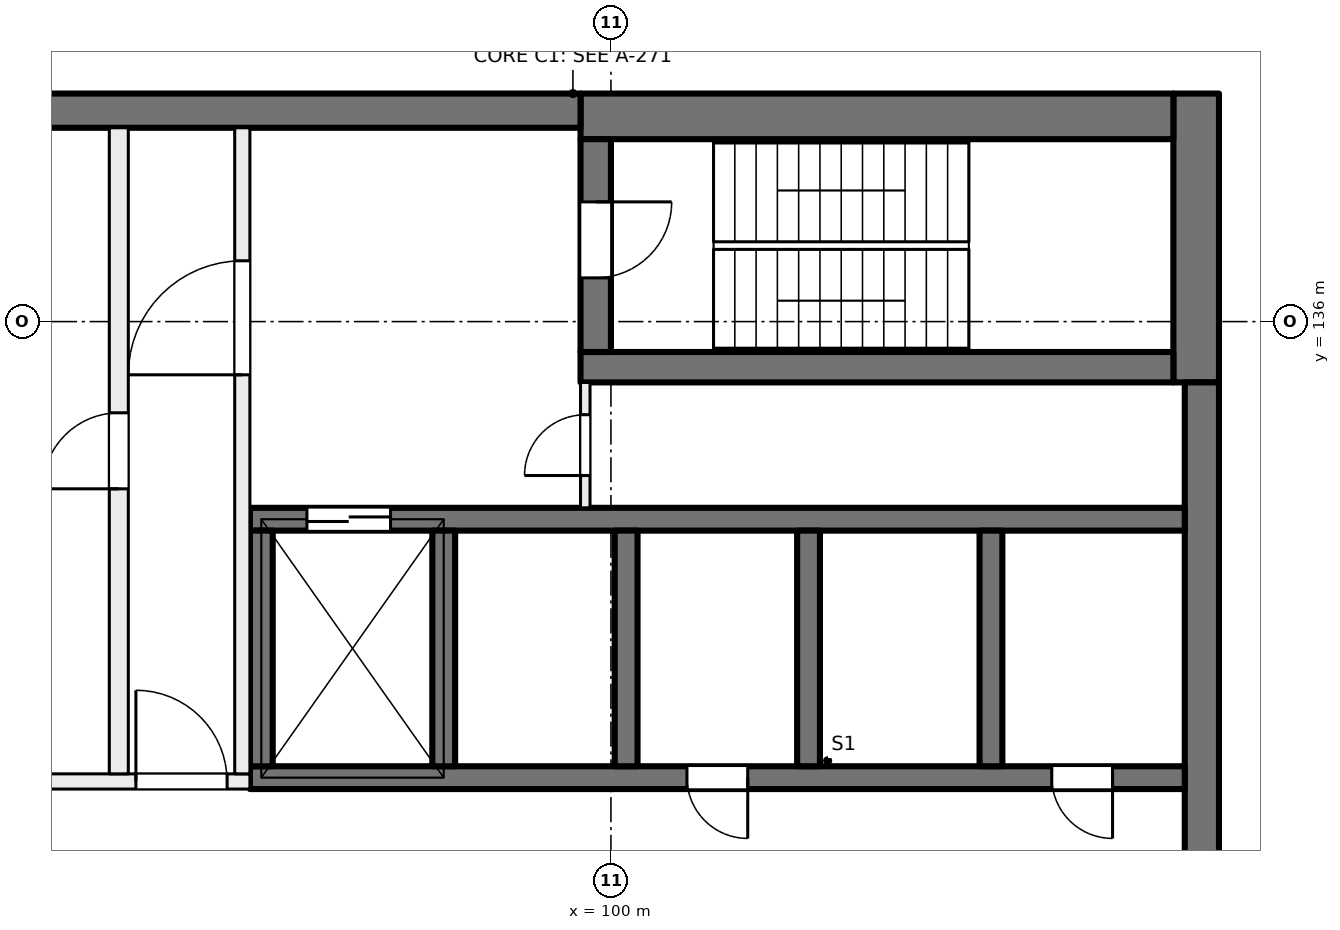
"""IFC4 building model, lengths in metres.
Left out: names, types, materials, properties, quantities, classifications, styles, units other than length and angle.
Written with IfcOpenShell. Run it as: python <this file> out.ifc"""

import sys

from ifc_helpers import new_model, si_unit, direction, frame, frame_2d, origin, place, context, subcontext, project, spatial, rectangle, extrude, element, fill, save


model = new_model("IFC4")
c1 = context("Model", 3, precision=1e-05, world=origin(), true_north=direction((0.0, 1.0)))
c2 = subcontext(c1, "Body", "Model", "MODEL_VIEW")
j1 = project(units=[si_unit("LENGTHUNIT", "METRE"), si_unit("PLANEANGLEUNIT", "RADIAN")], contexts=[c1])
p1 = place(None, origin())
s1 = spatial("IfcSite", under=j1, at=p1, CompositionType="ELEMENT")
p2 = place(p1, origin())
s2 = spatial("IfcBuilding", under=s1, at=p2, CompositionType="ELEMENT")
p3 = place(p2, frame((0.0, 0.0, 286.5)))
s3 = spatial("IfcBuildingStorey", under=s2, at=p3, CompositionType="ELEMENT", Elevation=286.5)
p4 = place(p3, frame((107.7, 139.0, 0.0), z_axis=(0.0, 0.0, 1.0), x_axis=(0.0, -1.0, 0.0)))
e1 = element("IfcWall", 1, at=p4, inside=s3, PredefinedType="SHEAR", context=c2, shape_type="SweptSolid", body=[
    extrude(rectangle(XDim=3.8, YDim=0.6, at=frame_2d((1.9, 0.0))), origin(), (0.0, 0.0, 1.0), 4.5),
])
p5 = place(p3, frame((107.775, 135.2, 0.0), z_axis=(0.0, 0.0, 1.0), x_axis=(0.0, -1.0, 0.0)))
e2 = element("IfcWall", 2, at=p5, inside=s3, PredefinedType="SHEAR", context=c2, shape_type="SweptSolid", body=[
    extrude(rectangle(XDim=14.4, YDim=0.45, at=frame_2d((7.2, 0.0))), origin(), (0.0, 0.0, 1.0), 4.5),
])
p6 = place(p3, frame((107.4, 138.7, 0.0), z_axis=(0.0, 0.0, 1.0), x_axis=(-1.0, 0.0, 0.0)))
e3 = element("IfcWall", 3, at=p6, inside=s3, PredefinedType="SHEAR", context=c2, shape_type="SweptSolid", body=[
    extrude(rectangle(XDim=7.8, YDim=0.6, at=frame_2d((3.9, 0.0))), origin(), (0.0, 0.0, 1.0), 4.5),
])
p7 = place(p3, frame((99.6, 138.775, 0.0), z_axis=(0.0, 0.0, 1.0), x_axis=(-1.0, 0.0, 0.0)))
e4 = element("IfcWall", 4, at=p7, inside=s3, PredefinedType="SHEAR", context=c2, shape_type="SweptSolid", body=[
    extrude(rectangle(XDim=9.05, YDim=0.45, at=frame_2d((4.525, 0.0))), origin(), (0.0, 0.0, 1.0), 4.5),
])
p8 = place(p3, frame((107.4, 135.4, 0.0), z_axis=(0.0, 0.0, 1.0), x_axis=(-1.0, 0.0, 0.0)))
e5 = element("IfcWall", 5, at=p8, inside=s3, PredefinedType="SHEAR", context=c2, shape_type="SweptSolid", body=[
    extrude(rectangle(XDim=7.8, YDim=0.4, at=frame_2d((3.9, 0.0))), origin(), (0.0, 0.0, 1.0), 4.5),
])
p9 = place(p3, frame((99.8, 138.4, 0.0), z_axis=(0.0, 0.0, 1.0), x_axis=(0.0, -1.0, 0.0)))
e6 = element("IfcWall", 6, at=p9, inside=s3, PredefinedType="SHEAR", context=c2, shape_type="SweptSolid", body=[
    extrude(rectangle(XDim=2.8, YDim=0.4, at=frame_2d((1.4, 0.0))), origin(), (0.0, 0.0, 1.0), 4.5),
])
p10 = place(p9, frame((0.825, 0.0, 0.0)))
e7 = element("IfcOpeningElement", 7, at=p10, cuts=e6, PredefinedType="OPENING", context=c2, shape_type="SweptSolid", body=[
    extrude(rectangle(XDim=1.0, YDim=2.1, at=frame_2d((0.5, 1.05))), frame((0.0, 0.21, 0.0), z_axis=(0.0, -1.0, 0.0), x_axis=(1.0, 0.0, 0.0)), (0.0, 0.0, 1.0), 0.42),
])
p11 = place(p3, frame((107.55, 130.0, 0.0), z_axis=(0.0, 0.0, 1.0), x_axis=(-1.0, 0.0, 0.0)))
e8 = element("IfcWall", 8, at=p11, inside=s3, PredefinedType="SHEAR", context=c2, shape_type="SweptSolid", body=[
    extrude(rectangle(XDim=12.3, YDim=0.3, at=frame_2d((6.15, 0.0))), origin(), (0.0, 0.0, 1.0), 4.5),
])
p12 = place(p11, frame((0.95, 0.0, 0.0)))
e9 = element("IfcOpeningElement", 9, at=p12, cuts=e8, PredefinedType="OPENING", context=c2, shape_type="SweptSolid", body=[
    extrude(rectangle(XDim=0.8, YDim=2.1, at=frame_2d((0.4, 1.05))), frame((0.0, 0.16, 0.0), z_axis=(0.0, -1.0, 0.0), x_axis=(1.0, 0.0, 0.0)), (0.0, 0.0, 1.0), 0.32),
])
p13 = place(p11, frame((5.75, 0.0, 0.0)))
e10 = element("IfcOpeningElement", 10, at=p13, cuts=e8, PredefinedType="OPENING", context=c2, shape_type="SweptSolid", body=[
    extrude(rectangle(XDim=0.8, YDim=2.1, at=frame_2d((0.4, 1.05))), frame((0.0, 0.16, 0.0), z_axis=(0.0, -1.0, 0.0), x_axis=(1.0, 0.0, 0.0)), (0.0, 0.0, 1.0), 0.32),
])
p14 = place(p3, frame((107.55, 133.4, 0.0), z_axis=(0.0, 0.0, 1.0), x_axis=(-1.0, 0.0, 0.0)))
e11 = element("IfcWall", 11, at=p14, inside=s3, PredefinedType="SHEAR", context=c2, shape_type="SweptSolid", body=[
    extrude(rectangle(XDim=12.3, YDim=0.3, at=frame_2d((6.15, 0.0))), origin(), (0.0, 0.0, 1.0), 4.5),
])
p15 = place(p14, frame((10.45, 0.0, 0.0)))
e12 = element("IfcOpeningElement", 12, at=p15, cuts=e11, PredefinedType="OPENING", context=c2, shape_type="SweptSolid", body=[
    extrude(rectangle(XDim=1.1, YDim=2.1, at=frame_2d((0.55, 1.05))), frame((0.0, 0.16, 0.0), z_axis=(0.0, -1.0, 0.0), x_axis=(1.0, 0.0, 0.0)), (0.0, 0.0, 1.0), 0.32),
])
for number, where, z_axis, x_axis in (
    (13, (105.0, 133.25, 0.0), (0.0, 0.0, 1.0), (0.0, -1.0, 0.0)),
    (14, (102.6, 133.25, 0.0), (0.0, 0.0, 1.0), (0.0, -1.0, 0.0)),
    (15, (100.2, 133.25, 0.0), (0.0, 0.0, 1.0), (0.0, -1.0, 0.0)),
    (16, (97.8, 133.25, 0.0), (0.0, 0.0, 1.0), (0.0, -1.0, 0.0)),
    (17, (95.4, 133.25, 0.0), (0.0, 0.0, 1.0), (0.0, -1.0, 0.0)),
):
    element("IfcWall", number, at=place(p3, frame(where, z_axis=z_axis, x_axis=x_axis)), inside=s3, PredefinedType="SHEAR", context=c2, shape_type="SweptSolid", body=[
        extrude(rectangle(XDim=3.1, YDim=0.3, at=frame_2d((1.55, 0.0))), origin(), (0.0, 0.0, 1.0), 4.5),
    ])
p16 = place(p3, frame((91.3, 129.95, 0.0), z_axis=(0.0, 0.0, 1.0), x_axis=(1.0, 0.0, 0.0)))
e18 = element("IfcWall", 18, at=p16, inside=s3, PredefinedType="PARTITIONING", context=c2, shape_type="SweptSolid", body=[
    extrude(rectangle(XDim=3.95, YDim=0.2, at=frame_2d((1.975, 0.0))), origin(), (0.0, 0.0, 1.0), 4.125),
])
p17 = place(p16, frame((2.45, 0.0, 0.0)))
e19 = element("IfcOpeningElement", 19, at=p17, cuts=e18, PredefinedType="OPENING", context=c2, shape_type="SweptSolid", body=[
    extrude(rectangle(XDim=1.2, YDim=2.1, at=frame_2d((0.6, 1.05))), frame((0.0, 0.11, 0.0), z_axis=(0.0, -1.0, 0.0), x_axis=(1.0, 0.0, 0.0)), (0.0, 0.0, 1.0), 0.22),
])
p18 = place(p3, frame((95.15, 130.05, 0.0), z_axis=(0.0, 0.0, 1.0), x_axis=(0.0, 1.0, 0.0)))
e20 = element("IfcWall", 20, at=p18, inside=s3, PredefinedType="PARTITIONING", context=c2, shape_type="SweptSolid", body=[
    extrude(rectangle(XDim=8.5, YDim=0.2, at=frame_2d((4.25, 0.0))), origin(), (0.0, 0.0, 1.0), 4.125),
])
p19 = place(p18, frame((5.25, 0.0, 0.0)))
e21 = element("IfcOpeningElement", 21, at=p19, cuts=e20, PredefinedType="OPENING", context=c2, shape_type="SweptSolid", body=[
    extrude(rectangle(XDim=1.5, YDim=2.1, at=frame_2d((0.75, 1.05))), frame((0.0, 0.11, 0.0), z_axis=(0.0, -1.0, 0.0), x_axis=(1.0, 0.0, 0.0)), (0.0, 0.0, 1.0), 0.22),
])
p20 = place(p3, frame((93.525, 130.05, 0.0), z_axis=(0.0, 0.0, 1.0), x_axis=(0.0, 1.0, 0.0)))
e22 = element("IfcWall", 22, at=p20, inside=s3, PredefinedType="PARTITIONING", context=c2, shape_type="SweptSolid", body=[
    extrude(rectangle(XDim=8.5, YDim=0.25, at=frame_2d((4.25, 0.0))), origin(), (0.0, 0.0, 1.0), 4.125),
])
p21 = place(p20, frame((3.75, 0.0, 0.0)))
e23 = element("IfcOpeningElement", 23, at=p21, cuts=e22, PredefinedType="OPENING", context=c2, shape_type="SweptSolid", body=[
    extrude(rectangle(XDim=1.0, YDim=2.1, at=frame_2d((0.5, 1.05))), frame((0.0, 0.135, 0.0), z_axis=(0.0, -1.0, 0.0), x_axis=(1.0, 0.0, 0.0)), (0.0, 0.0, 1.0), 0.27),
])
p22 = place(p3, frame((99.663, 133.55, 0.0), z_axis=(0.0, 0.0, 1.0), x_axis=(0.0, 1.0, 0.0)))
e24 = element("IfcWall", 24, at=p22, inside=s3, PredefinedType="PARTITIONING", context=c2, shape_type="SweptSolid", body=[
    extrude(rectangle(XDim=1.65, YDim=0.125, at=frame_2d((0.825, 0.0))), origin(), (0.0, 0.0, 1.0), 4.125),
])
p23 = place(p22, frame((0.425, 0.0, 0.0)))
e25 = element("IfcOpeningElement", 25, at=p23, cuts=e24, PredefinedType="OPENING", context=c2, shape_type="SweptSolid", body=[
    extrude(rectangle(XDim=0.8, YDim=2.1, at=frame_2d((0.4, 1.05))), frame((0.0, 0.073, 0.0), z_axis=(0.0, -1.0, 0.0), x_axis=(1.0, 0.0, 0.0)), (0.0, 0.0, 1.0), 0.145),
])
p24 = place(p12, origin())
e26 = element("IfcDoor", 26, at=p24, inside=s3, OperationType="SINGLE_SWING_RIGHT", PredefinedType="DOOR", context=c2, shape_type="SweptSolid", body=[
    extrude(rectangle(XDim=0.8, YDim=2.1, at=frame_2d((0.4, 1.05))), frame((0.0, 0.025, 0.0), z_axis=(0.0, -1.0, 0.0), x_axis=(1.0, 0.0, 0.0)), (0.0, 0.0, 1.0), 0.05),
])
fill(e9, e26)
p25 = place(p13, origin())
e27 = element("IfcDoor", 27, at=p25, inside=s3, OperationType="SINGLE_SWING_LEFT", PredefinedType="DOOR", context=c2, shape_type="SweptSolid", body=[
    extrude(rectangle(XDim=0.8, YDim=2.1, at=frame_2d((0.4, 1.05))), frame((0.0, 0.025, 0.0), z_axis=(0.0, -1.0, 0.0), x_axis=(1.0, 0.0, 0.0)), (0.0, 0.0, 1.0), 0.05),
])
fill(e10, e27)
p26 = place(p17, origin())
e28 = element("IfcDoor", 28, at=p26, inside=s3, OperationType="DOUBLE_DOOR_SINGLE_SWING", PredefinedType="DOOR", context=c2, shape_type="SweptSolid", body=[
    extrude(rectangle(XDim=1.2, YDim=2.1, at=frame_2d((0.6, 1.05))), frame((0.0, 0.025, 0.0), z_axis=(0.0, -1.0, 0.0), x_axis=(1.0, 0.0, 0.0)), (0.0, 0.0, 1.0), 0.05),
])
fill(e19, e28)
p27 = place(p19, origin())
e29 = element("IfcDoor", 29, at=p27, inside=s3, OperationType="DOUBLE_DOOR_SINGLE_SWING", PredefinedType="DOOR", context=c2, shape_type="SweptSolid", body=[
    extrude(rectangle(XDim=1.5, YDim=2.1, at=frame_2d((0.75, 1.05))), frame((0.0, 0.025, 0.0), z_axis=(0.0, -1.0, 0.0), x_axis=(1.0, 0.0, 0.0)), (0.0, 0.0, 1.0), 0.05),
])
fill(e21, e29)
p28 = place(p10, origin())
e30 = element("IfcDoor", 30, at=p28, inside=s3, OperationType="SINGLE_SWING_RIGHT", PredefinedType="DOOR", context=c2, shape_type="SweptSolid", body=[
    extrude(rectangle(XDim=1.0, YDim=2.1, at=frame_2d((0.5, 1.05))), frame((0.0, 0.025, 0.0), z_axis=(0.0, -1.0, 0.0), x_axis=(1.0, 0.0, 0.0)), (0.0, 0.0, 1.0), 0.05),
])
fill(e7, e30)
p29 = place(p23, origin())
e31 = element("IfcDoor", 31, at=p29, inside=s3, OperationType="SINGLE_SWING_LEFT", PredefinedType="DOOR", context=c2, shape_type="SweptSolid", body=[
    extrude(rectangle(XDim=0.8, YDim=2.1, at=frame_2d((0.4, 1.05))), frame((0.0, 0.025, 0.0), z_axis=(0.0, -1.0, 0.0), x_axis=(1.0, 0.0, 0.0)), (0.0, 0.0, 1.0), 0.05),
])
fill(e25, e31)
p30 = place(p21, origin())
e32 = element("IfcDoor", 32, at=p30, inside=s3, OperationType="SINGLE_SWING_RIGHT", PredefinedType="DOOR", context=c2, shape_type="SweptSolid", body=[
    extrude(rectangle(XDim=1.0, YDim=2.1, at=frame_2d((0.5, 1.05))), frame((0.0, 0.025, 0.0), z_axis=(0.0, -1.0, 0.0), x_axis=(1.0, 0.0, 0.0)), (0.0, 0.0, 1.0), 0.05),
])
fill(e23, e32)
p31 = place(p15, origin())
e33 = element("IfcDoor", 33, at=p31, inside=s3, OperationType="DOUBLE_DOOR_SLIDING", PredefinedType="DOOR", context=c2, shape_type="SweptSolid", body=[
    extrude(rectangle(XDim=1.1, YDim=2.1, at=frame_2d((0.55, 1.05))), frame((0.0, 0.025, 0.0), z_axis=(0.0, -1.0, 0.0), x_axis=(1.0, 0.0, 0.0)), (0.0, 0.0, 1.0), 0.05),
])
fill(e12, e33)
save(model, sys.argv[1])
